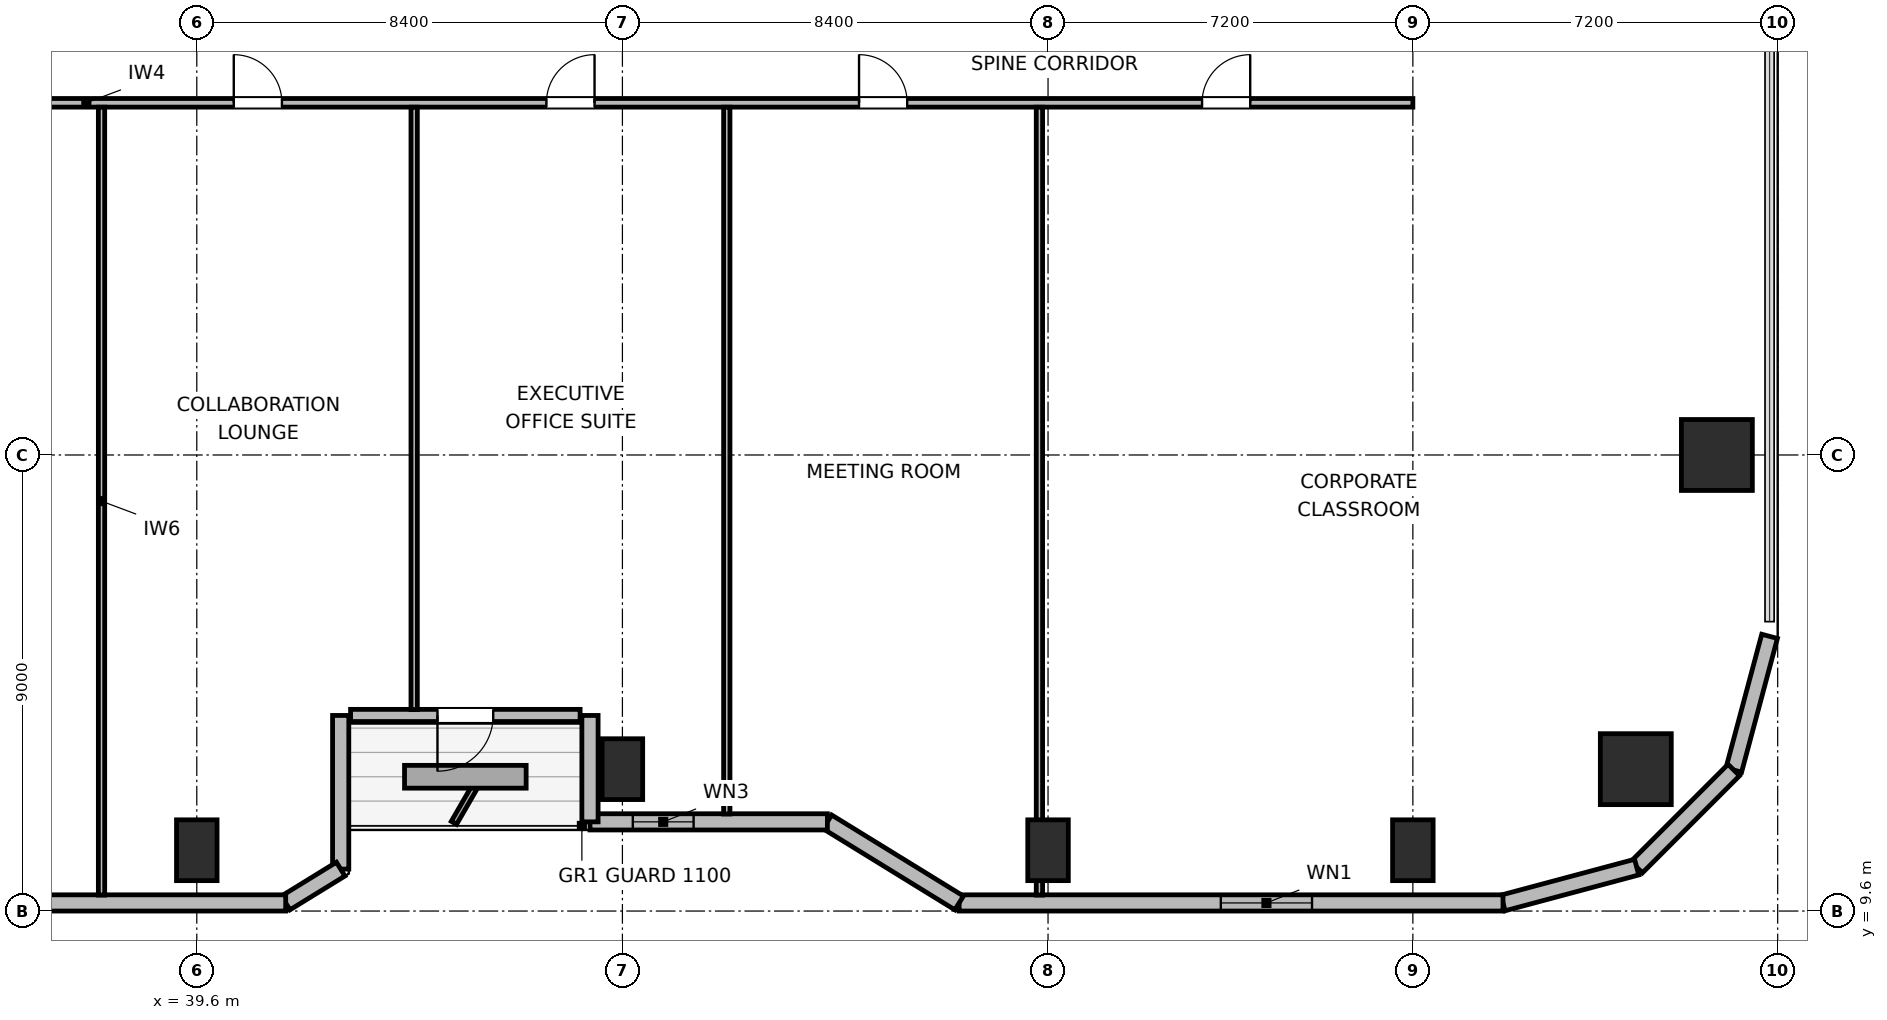
"""IFC4 building model, lengths in metres.
Left out: names, types, materials, properties, quantities, classifications, styles, units other than length and angle.
Written with IfcOpenShell. Run it as: python <this file> out.ifc"""

import sys

from ifc_helpers import new_model, si_unit, direction, frame, frame_2d, origin, origin_2d, place, context, subcontext, project, spatial, rectangle, circle, extrude, element, fill, save


model = new_model("IFC4")
c1 = context("Model", 3, precision=1e-05, world=origin(), true_north=direction((0.0, 1.0)))
c2 = subcontext(c1, "Body", "Model", "MODEL_VIEW")
j1 = project(units=[si_unit("LENGTHUNIT", "METRE"), si_unit("PLANEANGLEUNIT", "RADIAN")], contexts=[c1])
p1 = place(None, origin())
s1 = spatial("IfcSite", under=j1, at=p1, CompositionType="ELEMENT")
p2 = place(p1, origin())
s2 = spatial("IfcBuilding", under=s1, at=p2, CompositionType="ELEMENT")
p3 = place(p2, frame((0.0, 0.0, 141.6)))
s3 = spatial("IfcBuildingStorey", under=s2, at=p3, CompositionType="ELEMENT", Elevation=141.6)
p4 = place(p3, frame((68.0, 12.4, 0.0), z_axis=(0.0, 0.0, 1.0), x_axis=(1.0, 0.0, 0.0)))
e1 = element("IfcColumn", 1, at=p4, inside=s3, PredefinedType="COLUMN", context=c2, shape_type="SweptSolid", body=[
    extrude(circle(Radius=0.7, at=origin_2d()), origin(), (0.0, 0.0, 1.0), 3.9),
])
for number, where, z_axis, x_axis in (
    (2, (39.6, 10.8, 0.0), (0.0, 0.0, 1.0), (1.0, 0.0, 0.0)),
    (3, (48.0, 12.4, 0.0), (0.0, 0.0, 1.0), (1.0, 0.0, 0.0)),
    (4, (56.4, 10.8, 0.0), (0.0, 0.0, 1.0), (1.0, 0.0, 0.0)),
    (5, (63.6, 10.8, 0.0), (0.0, 0.0, 1.0), (1.0, 0.0, 0.0)),
):
    element("IfcColumn", number, at=place(p3, frame(where, z_axis=z_axis, x_axis=x_axis)), inside=s3, PredefinedType="COLUMN", context=c2, shape_type="SweptSolid", body=[
        extrude(rectangle(XDim=0.8, YDim=1.2, at=origin_2d()), origin(), (0.0, 0.0, 1.0), 3.9),
    ])
p5 = place(p3, frame((69.6, 18.6, 0.0), z_axis=(0.0, 0.0, 1.0), x_axis=(1.0, 0.0, 0.0)))
e6 = element("IfcColumn", 6, at=p5, inside=s3, PredefinedType="COLUMN", context=c2, shape_type="SweptSolid", body=[
    extrude(rectangle(XDim=1.4, YDim=1.4, at=origin_2d()), origin(), (0.0, 0.0, 1.0), 3.9),
])
p6 = place(p3, frame((70.64, 15.021, 0.0), z_axis=(0.0, 0.0, 1.0), x_axis=(-0.258613949072, -0.965980758269, 0.0)))
e7 = element("IfcWall", 7, at=p6, inside=s3, PredefinedType="SOLIDWALL", context=c2, shape_type="SweptSolid", body=[
    extrude(rectangle(XDim=2.731, YDim=0.32, at=frame_2d((1.366, 0.0))), origin(), (0.0, 0.0, 1.0), 3.6),
])
p7 = place(p3, frame((69.934, 12.383, 0.0), z_axis=(0.0, 0.0, 1.0), x_axis=(-0.707151821269, -0.707061738235, 0.0)))
e8 = element("IfcWall", 8, at=p7, inside=s3, PredefinedType="SOLIDWALL", context=c2, shape_type="SweptSolid", body=[
    extrude(rectangle(XDim=2.71, YDim=0.32, at=frame_2d((1.355, 0.0))), origin(), (0.0, 0.0, 1.0), 3.6),
])
p8 = place(p3, frame((68.017, 10.467, 0.0), z_axis=(0.0, 0.0, 1.0), x_axis=(-0.965958423373, -0.25869736047, 0.0)))
e9 = element("IfcWall", 9, at=p8, inside=s3, PredefinedType="SOLIDWALL", context=c2, shape_type="SweptSolid", body=[
    extrude(rectangle(XDim=2.731, YDim=0.32, at=frame_2d((1.366, 0.0))), origin(), (0.0, 0.0, 1.0), 3.6),
])
p9 = place(p3, frame((65.379, 9.76, 0.0), z_axis=(0.0, 0.0, 1.0), x_axis=(-1.0, 0.0, 0.0)))
e10 = element("IfcWall", 10, at=p9, inside=s3, PredefinedType="SOLIDWALL", context=c2, shape_type="SweptSolid", body=[
    extrude(rectangle(XDim=10.734, YDim=0.32, at=frame_2d((5.367, 0.0))), origin(), (0.0, 0.0, 1.0), 3.6),
])
p10 = place(p9, frame((3.769, 0.0, 0.85)))
e11 = element("IfcOpeningElement", 11, at=p10, cuts=e10, PredefinedType="OPENING", context=c2, shape_type="SweptSolid", body=[
    extrude(rectangle(XDim=1.8, YDim=1.1, at=frame_2d((0.9, 0.55))), frame((0.0, 0.17, 0.0), z_axis=(0.0, -1.0, 0.0), x_axis=(1.0, 0.0, 0.0)), (0.0, 0.0, 1.0), 0.34),
])
p11 = place(p3, frame((54.645, 9.76, 0.0), z_axis=(0.0, 0.0, 1.0), x_axis=(-0.851630857047, 0.524142044989, 0.0)))
e12 = element("IfcWall", 12, at=p11, inside=s3, PredefinedType="SOLIDWALL", context=c2, shape_type="SweptSolid", body=[
    extrude(rectangle(XDim=3.053, YDim=0.32, at=frame_2d((1.526, 0.0))), origin(), (0.0, 0.0, 1.0), 2.245),
])
p12 = place(p3, frame((52.045, 11.36, 0.0), z_axis=(0.0, 0.0, 1.0), x_axis=(-1.0, 0.0, 0.0)))
e13 = element("IfcWall", 13, at=p12, inside=s3, PredefinedType="SOLIDWALL", context=c2, shape_type="SweptSolid", body=[
    extrude(rectangle(XDim=4.685, YDim=0.32, at=frame_2d((2.343, 0.0))), origin(), (0.0, 0.0, 1.0), 2.245),
])
p13 = place(p12, frame((2.64, 0.0, 0.85)))
e14 = element("IfcOpeningElement", 14, at=p13, cuts=e13, PredefinedType="OPENING", context=c2, shape_type="SweptSolid", body=[
    extrude(rectangle(XDim=1.2, YDim=1.1, at=frame_2d((0.6, 0.55))), frame((0.0, 0.17, 0.0), z_axis=(0.0, -1.0, 0.0), x_axis=(1.0, 0.0, 0.0)), (0.0, 0.0, 1.0), 0.34),
])
p14 = place(p3, frame((47.36, 11.36, 0.0), z_axis=(0.0, 0.0, 1.0), x_axis=(0.0, 1.0, 0.0)))
e15 = element("IfcWall", 15, at=p14, inside=s3, PredefinedType="SOLIDWALL", context=c2, shape_type="SweptSolid", body=[
    extrude(rectangle(XDim=2.1, YDim=0.32, at=frame_2d((1.05, 0.0))), origin(), (0.0, 0.0, 1.0), 2.135),
])
p15 = place(p3, frame((47.165, 13.46, 0.0), z_axis=(0.0, 0.0, 1.0), x_axis=(-1.0, 0.0, 0.0)))
e16 = element("IfcWall", 16, at=p15, inside=s3, PredefinedType="SOLIDWALL", context=c2, shape_type="SweptSolid", body=[
    extrude(rectangle(XDim=4.53, YDim=0.24, at=frame_2d((2.265, 0.0))), origin(), (0.0, 0.0, 1.0), 2.135),
])
p16 = place(p15, frame((1.715, 0.0, 0.0)))
e17 = element("IfcOpeningElement", 17, at=p16, cuts=e16, PredefinedType="OPENING", context=c2, shape_type="SweptSolid", body=[
    extrude(rectangle(XDim=1.1, YDim=2.04, at=frame_2d((0.55, 1.02))), frame((0.0, 0.13, 0.0), z_axis=(0.0, -1.0, 0.0), x_axis=(1.0, 0.0, 0.0)), (0.0, 0.0, 1.0), 0.26),
])
p17 = place(p3, frame((42.44, 13.46, 0.0), z_axis=(0.0, 0.0, 1.0), x_axis=(0.0, -1.0, 0.0)))
e18 = element("IfcWall", 18, at=p17, inside=s3, PredefinedType="SOLIDWALL", context=c2, shape_type="SweptSolid", body=[
    extrude(rectangle(XDim=3.032, YDim=0.32, at=frame_2d((1.516, 0.0))), origin(), (0.0, 0.0, 1.0), 2.245),
])
p18 = place(p3, frame((42.44, 10.427, 0.0), z_axis=(0.0, 0.0, 1.0), x_axis=(-0.851776724646, -0.523904964045, 0.0)))
e19 = element("IfcWall", 19, at=p18, inside=s3, PredefinedType="SOLIDWALL", context=c2, shape_type="SweptSolid", body=[
    extrude(rectangle(XDim=1.274, YDim=0.32, at=frame_2d((0.637, 0.0))), origin(), (0.0, 0.0, 1.0), 3.6),
])
p19 = place(p3, frame((41.355, 9.76, 0.0), z_axis=(0.0, 0.0, 1.0), x_axis=(-1.0, 0.0, 0.0)))
e20 = element("IfcWall", 20, at=p19, inside=s3, PredefinedType="SOLIDWALL", context=c2, shape_type="SweptSolid", body=[
    extrude(rectangle(XDim=17.934, YDim=0.32, at=frame_2d((8.967, 0.0))), origin(), (0.0, 0.0, 1.0), 3.6),
])
p20 = place(p3, frame((30.35, 25.55, 0.0), z_axis=(0.0, 0.0, 1.0), x_axis=(1.0, 0.0, 0.0)))
e21 = element("IfcWall", 21, at=p20, inside=s3, PredefinedType="PARTITIONING", context=c2, shape_type="SweptSolid", body=[
    extrude(rectangle(XDim=33.25, YDim=0.17, at=frame_2d((16.625, 0.0))), origin(), (0.0, 0.0, 1.0), 3.6),
])
p21 = place(p20, frame((3.21, 0.0, 0.0)))
e22 = element("IfcOpeningElement", 22, at=p21, cuts=e21, PredefinedType="OPENING", context=c2, shape_type="SweptSolid", body=[
    extrude(rectangle(XDim=0.95, YDim=2.04, at=frame_2d((0.475, 1.02))), frame((0.0, 0.095, 0.0), z_axis=(0.0, -1.0, 0.0), x_axis=(1.0, 0.0, 0.0)), (0.0, 0.0, 1.0), 0.19),
])
p22 = place(p20, frame((9.98, 0.0, 0.0)))
e23 = element("IfcOpeningElement", 23, at=p22, cuts=e21, PredefinedType="OPENING", context=c2, shape_type="SweptSolid", body=[
    extrude(rectangle(XDim=0.95, YDim=2.04, at=frame_2d((0.475, 1.02))), frame((0.0, 0.095, 0.0), z_axis=(0.0, -1.0, 0.0), x_axis=(1.0, 0.0, 0.0)), (0.0, 0.0, 1.0), 0.19),
])
p23 = place(p20, frame((16.15, 0.0, 0.0)))
e24 = element("IfcOpeningElement", 24, at=p23, cuts=e21, PredefinedType="OPENING", context=c2, shape_type="SweptSolid", body=[
    extrude(rectangle(XDim=0.95, YDim=2.04, at=frame_2d((0.475, 1.02))), frame((0.0, 0.095, 0.0), z_axis=(0.0, -1.0, 0.0), x_axis=(1.0, 0.0, 0.0)), (0.0, 0.0, 1.0), 0.19),
])
p24 = place(p20, frame((22.32, 0.0, 0.0)))
e25 = element("IfcOpeningElement", 25, at=p24, cuts=e21, PredefinedType="OPENING", context=c2, shape_type="SweptSolid", body=[
    extrude(rectangle(XDim=0.95, YDim=2.04, at=frame_2d((0.475, 1.02))), frame((0.0, 0.095, 0.0), z_axis=(0.0, -1.0, 0.0), x_axis=(1.0, 0.0, 0.0)), (0.0, 0.0, 1.0), 0.19),
])
p25 = place(p20, frame((29.09, 0.0, 0.0)))
e26 = element("IfcOpeningElement", 26, at=p25, cuts=e21, PredefinedType="OPENING", context=c2, shape_type="SweptSolid", body=[
    extrude(rectangle(XDim=0.95, YDim=2.04, at=frame_2d((0.475, 1.02))), frame((0.0, 0.095, 0.0), z_axis=(0.0, -1.0, 0.0), x_axis=(1.0, 0.0, 0.0)), (0.0, 0.0, 1.0), 0.19),
])
p26 = place(p3, frame((37.72, 9.915, 0.0), z_axis=(0.0, 0.0, 1.0), x_axis=(0.0, 1.0, 0.0)))
e27 = element("IfcWall", 27, at=p26, inside=s3, PredefinedType="PARTITIONING", context=c2, shape_type="SweptSolid", body=[
    extrude(rectangle(XDim=15.548, YDim=0.125, at=frame_2d((7.774, 0.0))), origin(), (0.0, 0.0, 1.0), 3.6),
])
p27 = place(p3, frame((43.89, 13.575, 0.0), z_axis=(0.0, 0.0, 1.0), x_axis=(0.0, 1.0, 0.0)))
e28 = element("IfcWall", 28, at=p27, inside=s3, PredefinedType="PARTITIONING", context=c2, shape_type="SweptSolid", body=[
    extrude(rectangle(XDim=11.888, YDim=0.125, at=frame_2d((5.944, 0.0))), origin(), (0.0, 0.0, 1.0), 2.963),
])
p28 = place(p3, frame((50.06, 11.515, 0.0), z_axis=(0.0, 0.0, 1.0), x_axis=(0.0, 1.0, 0.0)))
e29 = element("IfcWall", 29, at=p28, inside=s3, PredefinedType="PARTITIONING", context=c2, shape_type="SweptSolid", body=[
    extrude(rectangle(XDim=13.948, YDim=0.125, at=frame_2d((6.974, 0.0))), origin(), (0.0, 0.0, 1.0), 3.6),
])
p29 = place(p3, frame((56.23, 9.915, 0.0), z_axis=(0.0, 0.0, 1.0), x_axis=(0.0, 1.0, 0.0)))
e30 = element("IfcWall", 30, at=p29, inside=s3, PredefinedType="PARTITIONING", context=c2, shape_type="SweptSolid", body=[
    extrude(rectangle(XDim=15.548, YDim=0.125, at=frame_2d((7.774, 0.0))), origin(), (0.0, 0.0, 1.0), 2.135),
])
p30 = place(p10, origin())
e31 = element("IfcWindow", 31, at=p30, inside=s3, PartitioningType="SINGLE_PANEL", PredefinedType="WINDOW", context=c2, shape_type="SweptSolid", body=[
    extrude(rectangle(XDim=1.8, YDim=1.1, at=frame_2d((0.9, 0.55))), frame((0.0, 0.03, 0.0), z_axis=(0.0, -1.0, 0.0), x_axis=(1.0, 0.0, 0.0)), (0.0, 0.0, 1.0), 0.06),
])
fill(e11, e31)
p31 = place(p13, origin())
e32 = element("IfcWindow", 32, at=p31, inside=s3, PartitioningType="SINGLE_PANEL", PredefinedType="WINDOW", context=c2, shape_type="SweptSolid", body=[
    extrude(rectangle(XDim=1.2, YDim=1.1, at=frame_2d((0.6, 0.55))), frame((0.0, 0.03, 0.0), z_axis=(0.0, -1.0, 0.0), x_axis=(1.0, 0.0, 0.0)), (0.0, 0.0, 1.0), 0.06),
])
fill(e14, e32)
p32 = place(p16, origin())
e33 = element("IfcDoor", 33, at=p32, inside=s3, OperationType="SINGLE_SWING_RIGHT", PredefinedType="DOOR", context=c2, shape_type="SweptSolid", body=[
    extrude(rectangle(XDim=1.1, YDim=2.04, at=frame_2d((0.55, 1.02))), frame((0.0, 0.025, 0.0), z_axis=(0.0, -1.0, 0.0), x_axis=(1.0, 0.0, 0.0)), (0.0, 0.0, 1.0), 0.05),
])
fill(e17, e33)
p33 = place(p22, origin())
e34 = element("IfcDoor", 34, at=p33, inside=s3, OperationType="SINGLE_SWING_LEFT", PredefinedType="DOOR", context=c2, shape_type="SweptSolid", body=[
    extrude(rectangle(XDim=0.95, YDim=2.04, at=frame_2d((0.475, 1.02))), frame((0.0, 0.025, 0.0), z_axis=(0.0, -1.0, 0.0), x_axis=(1.0, 0.0, 0.0)), (0.0, 0.0, 1.0), 0.05),
])
fill(e23, e34)
p34 = place(p23, origin())
e35 = element("IfcDoor", 35, at=p34, inside=s3, OperationType="SINGLE_SWING_RIGHT", PredefinedType="DOOR", context=c2, shape_type="SweptSolid", body=[
    extrude(rectangle(XDim=0.95, YDim=2.04, at=frame_2d((0.475, 1.02))), frame((0.0, 0.025, 0.0), z_axis=(0.0, -1.0, 0.0), x_axis=(1.0, 0.0, 0.0)), (0.0, 0.0, 1.0), 0.05),
])
fill(e24, e35)
p35 = place(p24, origin())
e36 = element("IfcDoor", 36, at=p35, inside=s3, OperationType="SINGLE_SWING_LEFT", PredefinedType="DOOR", context=c2, shape_type="SweptSolid", body=[
    extrude(rectangle(XDim=0.95, YDim=2.04, at=frame_2d((0.475, 1.02))), frame((0.0, 0.025, 0.0), z_axis=(0.0, -1.0, 0.0), x_axis=(1.0, 0.0, 0.0)), (0.0, 0.0, 1.0), 0.05),
])
fill(e25, e36)
p36 = place(p25, origin())
e37 = element("IfcDoor", 37, at=p36, inside=s3, OperationType="SINGLE_SWING_RIGHT", PredefinedType="DOOR", context=c2, shape_type="SweptSolid", body=[
    extrude(rectangle(XDim=0.95, YDim=2.04, at=frame_2d((0.475, 1.02))), frame((0.0, 0.025, 0.0), z_axis=(0.0, -1.0, 0.0), x_axis=(1.0, 0.0, 0.0)), (0.0, 0.0, 1.0), 0.05),
])
fill(e26, e37)
save(model, sys.argv[1])
